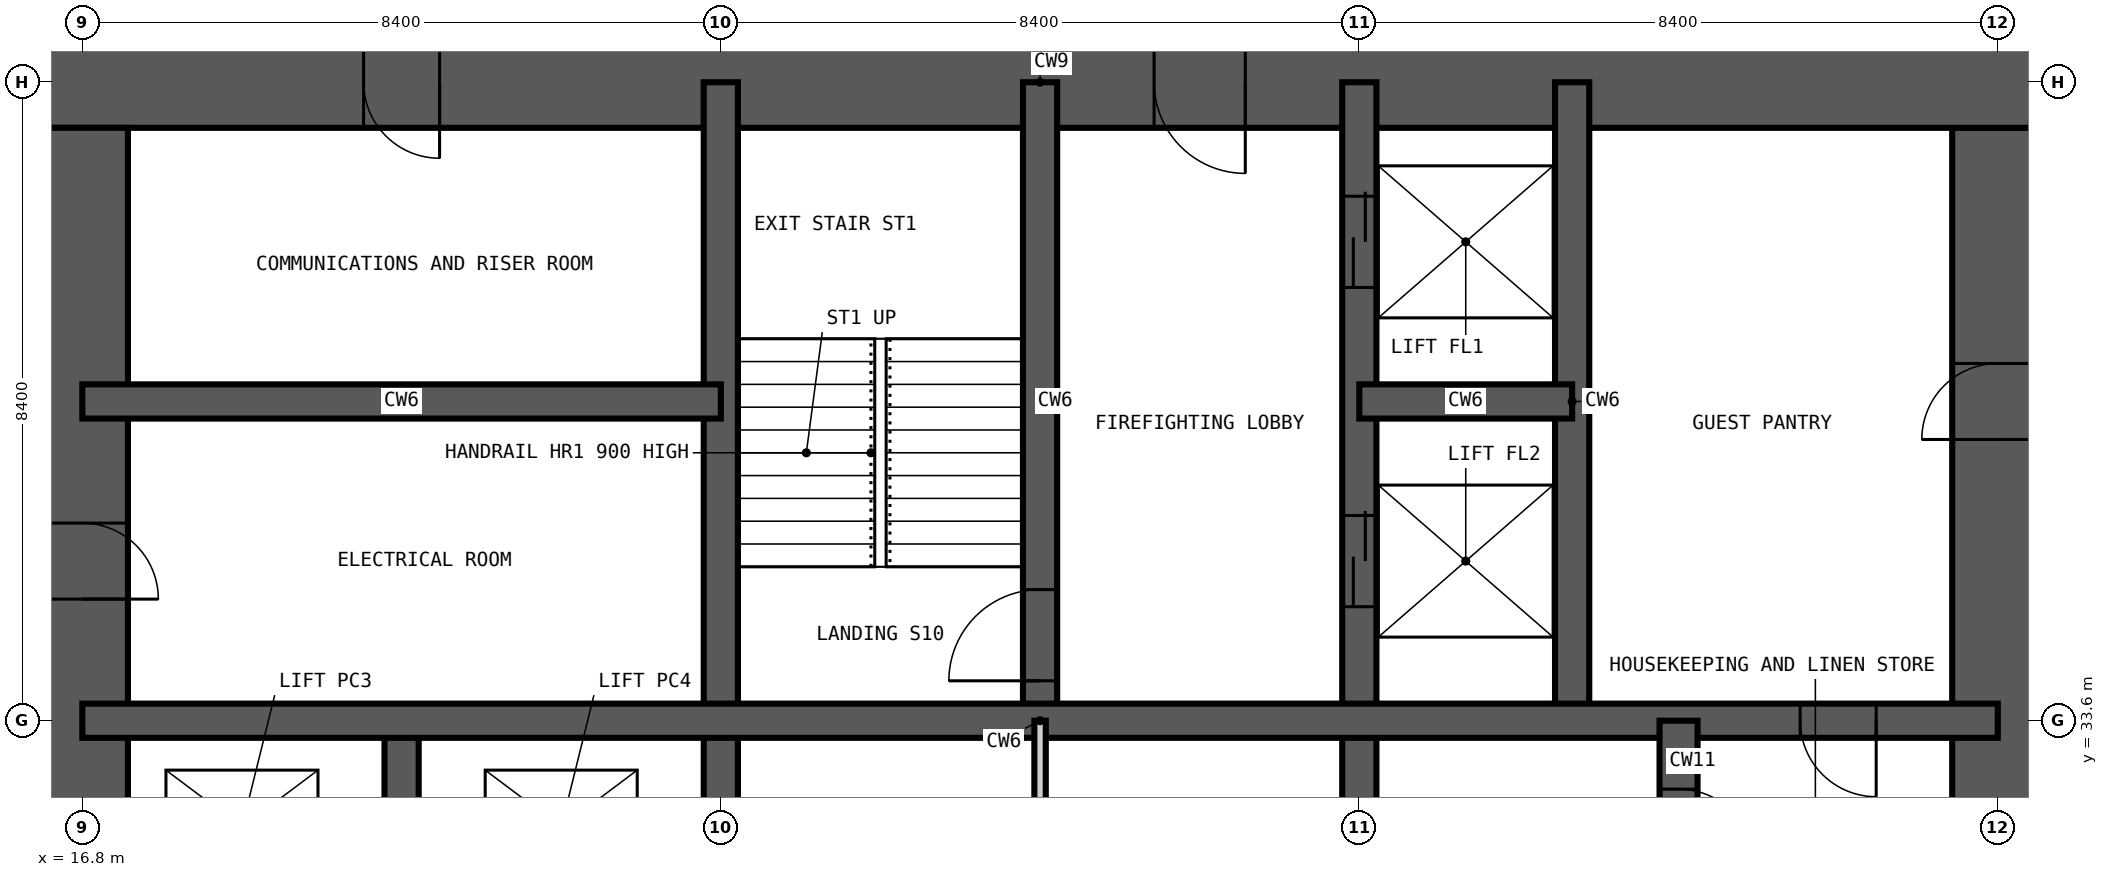
"""IFC4 building model, lengths in metres.
Left out: names, types, materials, properties, quantities, classifications, styles, units other than length and angle.
Written with IfcOpenShell. Run it as: python <this file> out.ifc"""

import sys

from ifc_helpers import new_model, si_unit, direction, frame, frame_2d, origin, place, context, subcontext, project, spatial, rectangle, extrude, element, fill, save


model = new_model("IFC4")
c1 = context("Model", 3, precision=1e-05, world=origin(), true_north=direction((0.0, 1.0)))
c2 = subcontext(c1, "Body", "Model", "MODEL_VIEW")
j1 = project(units=[si_unit("LENGTHUNIT", "METRE"), si_unit("PLANEANGLEUNIT", "RADIAN")], contexts=[c1])
p1 = place(None, origin())
s1 = spatial("IfcSite", under=j1, at=p1, CompositionType="ELEMENT")
p2 = place(p1, origin())
s2 = spatial("IfcBuilding", under=s1, at=p2, CompositionType="ELEMENT")
p3 = place(p2, frame((0.0, 0.0, 97.2)))
s3 = spatial("IfcBuildingStorey", under=s2, at=p3, CompositionType="ELEMENT", Elevation=97.2)
p4 = place(p3, frame((42.0, 17.4, -0.35), z_axis=(0.0, 0.0, 1.0), x_axis=(0.0, 1.0, 0.0)))
e1 = element("IfcWall", 1, at=p4, inside=s3, PredefinedType="SHEAR", context=c2, shape_type="SweptSolid", body=[
    extrude(rectangle(XDim=24.0, YDim=1.2, at=frame_2d((12.0, 0.0))), origin(), (0.0, 0.0, 1.0), 3.6),
])
p5 = place(p4, frame((0.2, 0.0, 0.35)))
e2 = element("IfcOpeningElement", 2, at=p5, cuts=e1, PredefinedType="OPENING", context=c2, shape_type="SweptSolid", body=[
    extrude(rectangle(XDim=1.2, YDim=2.2, at=frame_2d((0.6, 1.1))), frame((0.0, 0.61, 0.0), z_axis=(0.0, -1.0, 0.0), x_axis=(1.0, 0.0, 0.0)), (0.0, 0.0, 1.0), 1.22),
])
p6 = place(p4, frame((11.1, 0.0, 0.35)))
e3 = element("IfcOpeningElement", 3, at=p6, cuts=e1, PredefinedType="OPENING", context=c2, shape_type="SweptSolid", body=[
    extrude(rectangle(XDim=1.8, YDim=2.2, at=frame_2d((0.9, 1.1))), frame((0.0, 0.61, 0.0), z_axis=(0.0, -1.0, 0.0), x_axis=(1.0, 0.0, 0.0)), (0.0, 0.0, 1.0), 1.22),
])
p7 = place(p4, frame((19.9, 0.0, 0.35)))
e4 = element("IfcOpeningElement", 4, at=p7, cuts=e1, PredefinedType="OPENING", context=c2, shape_type="SweptSolid", body=[
    extrude(rectangle(XDim=1.0, YDim=2.1, at=frame_2d((0.5, 1.05))), frame((0.0, 0.61, 0.0), z_axis=(0.0, -1.0, 0.0), x_axis=(1.0, 0.0, 0.0)), (0.0, 0.0, 1.0), 1.22),
])
p8 = place(p3, frame((42.6, 42.0, -0.35), z_axis=(0.0, 0.0, 1.0), x_axis=(-1.0, 0.0, 0.0)))
e5 = element("IfcWall", 5, at=p8, inside=s3, PredefinedType="SHEAR", context=c2, shape_type="SweptSolid", body=[
    extrude(rectangle(XDim=26.4, YDim=1.2, at=frame_2d((13.2, 0.0))), origin(), (0.0, 0.0, 1.0), 3.6),
])
p9 = place(p8, frame((21.1, 0.0, 0.35)))
e6 = element("IfcOpeningElement", 6, at=p9, cuts=e5, PredefinedType="OPENING", context=c2, shape_type="SweptSolid", body=[
    extrude(rectangle(XDim=1.0, YDim=2.1, at=frame_2d((0.5, 1.05))), frame((0.0, 0.61, 0.0), z_axis=(0.0, -1.0, 0.0), x_axis=(1.0, 0.0, 0.0)), (0.0, 0.0, 1.0), 1.22),
])
p10 = place(p8, frame((10.5, 0.0, 0.35)))
e7 = element("IfcOpeningElement", 7, at=p10, cuts=e5, PredefinedType="OPENING", context=c2, shape_type="SweptSolid", body=[
    extrude(rectangle(XDim=1.2, YDim=2.2, at=frame_2d((0.6, 1.1))), frame((0.0, 0.61, 0.0), z_axis=(0.0, -1.0, 0.0), x_axis=(1.0, 0.0, 0.0)), (0.0, 0.0, 1.0), 1.22),
])
p11 = place(p3, frame((16.8, 41.4, -0.35), z_axis=(0.0, 0.0, 1.0), x_axis=(0.0, -1.0, 0.0)))
e8 = element("IfcWall", 8, at=p11, inside=s3, PredefinedType="SHEAR", context=c2, shape_type="SweptSolid", body=[
    extrude(rectangle(XDim=24.0, YDim=1.2, at=frame_2d((12.0, 0.0))), origin(), (0.0, 0.0, 1.0), 3.6),
])
p12 = place(p11, frame((11.1, 0.0, 0.35)))
e9 = element("IfcOpeningElement", 9, at=p12, cuts=e8, PredefinedType="OPENING", context=c2, shape_type="SweptSolid", body=[
    extrude(rectangle(XDim=1.8, YDim=2.2, at=frame_2d((0.9, 1.1))), frame((0.0, 0.61, 0.0), z_axis=(0.0, -1.0, 0.0), x_axis=(1.0, 0.0, 0.0)), (0.0, 0.0, 1.0), 1.22),
])
p13 = place(p11, frame((19.9, 0.0, 0.35)))
e10 = element("IfcOpeningElement", 10, at=p13, cuts=e8, PredefinedType="OPENING", context=c2, shape_type="SweptSolid", body=[
    extrude(rectangle(XDim=1.0, YDim=2.1, at=frame_2d((0.5, 1.05))), frame((0.0, 0.61, 0.0), z_axis=(0.0, -1.0, 0.0), x_axis=(1.0, 0.0, 0.0)), (0.0, 0.0, 1.0), 1.22),
])
p14 = place(p11, frame((5.2, 0.0, 0.35)))
e11 = element("IfcOpeningElement", 11, at=p14, cuts=e8, PredefinedType="OPENING", context=c2, shape_type="SweptSolid", body=[
    extrude(rectangle(XDim=1.0, YDim=2.1, at=frame_2d((0.5, 1.05))), frame((0.0, 0.61, 0.0), z_axis=(0.0, -1.0, 0.0), x_axis=(1.0, 0.0, 0.0)), (0.0, 0.0, 1.0), 1.22),
])
p15 = place(p3, frame((21.0, 30.8, -0.35), z_axis=(0.0, 0.0, 1.0), x_axis=(0.0, 1.0, 0.0)))
e12 = element("IfcWall", 12, at=p15, inside=s3, PredefinedType="SHEAR", context=c2, shape_type="SweptSolid", body=[
    extrude(rectangle(XDim=2.8, YDim=0.45, at=frame_2d((1.4, 0.0))), origin(), (0.0, 0.0, 1.0), 3.6),
])
p16 = place(p3, frame((25.2, 16.8, -0.35), z_axis=(0.0, 0.0, 1.0), x_axis=(0.0, 1.0, 0.0)))
e13 = element("IfcWall", 13, at=p16, inside=s3, PredefinedType="SHEAR", context=c2, shape_type="SweptSolid", body=[
    extrude(rectangle(XDim=25.2, YDim=0.45, at=frame_2d((12.6, 0.0))), origin(), (0.0, 0.0, 1.0), 3.6),
])
p17 = place(p16, frame((12.1, 0.0, 0.35)))
e14 = element("IfcOpeningElement", 14, at=p17, cuts=e13, PredefinedType="OPENING", context=c2, shape_type="SweptSolid", body=[
    extrude(rectangle(XDim=1.0, YDim=2.1, at=frame_2d((0.5, 1.05))), frame((0.0, 0.235, 0.0), z_axis=(0.0, -1.0, 0.0), x_axis=(1.0, 0.0, 0.0)), (0.0, 0.0, 1.0), 0.47),
])
p18 = place(p3, frame((29.4, 33.6, -0.35), z_axis=(0.0, 0.0, 1.0), x_axis=(0.0, 1.0, 0.0)))
e15 = element("IfcWall", 15, at=p18, inside=s3, PredefinedType="SHEAR", context=c2, shape_type="SweptSolid", body=[
    extrude(rectangle(XDim=8.4, YDim=0.45, at=frame_2d((4.2, 0.0))), origin(), (0.0, 0.0, 1.0), 3.6),
])
p19 = place(p18, frame((0.525, 0.0, 0.35)))
e16 = element("IfcOpeningElement", 16, at=p19, cuts=e15, PredefinedType="OPENING", context=c2, shape_type="SweptSolid", body=[
    extrude(rectangle(XDim=1.2, YDim=2.2, at=frame_2d((0.6, 1.1))), frame((0.0, 0.235, 0.0), z_axis=(0.0, -1.0, 0.0), x_axis=(1.0, 0.0, 0.0)), (0.0, 0.0, 1.0), 0.47),
])
p20 = place(p3, frame((33.6, 16.8, -0.35), z_axis=(0.0, 0.0, 1.0), x_axis=(0.0, 1.0, 0.0)))
e17 = element("IfcWall", 17, at=p20, inside=s3, PredefinedType="SHEAR", context=c2, shape_type="SweptSolid", body=[
    extrude(rectangle(XDim=25.2, YDim=0.45, at=frame_2d((12.6, 0.0))), origin(), (0.0, 0.0, 1.0), 3.6),
])
p21 = place(p20, frame((22.5, 0.0, 0.35)))
e18 = element("IfcOpeningElement", 18, at=p21, cuts=e17, PredefinedType="OPENING", context=c2, shape_type="SweptSolid", body=[
    extrude(rectangle(XDim=1.2, YDim=2.2, at=frame_2d((0.6, 1.1))), frame((0.0, 0.235, 0.0), z_axis=(0.0, -1.0, 0.0), x_axis=(1.0, 0.0, 0.0)), (0.0, 0.0, 1.0), 0.47),
])
p22 = place(p20, frame((18.3, 0.0, 0.35)))
e19 = element("IfcOpeningElement", 19, at=p22, cuts=e17, PredefinedType="OPENING", context=c2, shape_type="SweptSolid", body=[
    extrude(rectangle(XDim=1.2, YDim=2.2, at=frame_2d((0.6, 1.1))), frame((0.0, 0.235, 0.0), z_axis=(0.0, -1.0, 0.0), x_axis=(1.0, 0.0, 0.0)), (0.0, 0.0, 1.0), 0.47),
])
p23 = place(p3, frame((36.4, 33.6, -0.35), z_axis=(0.0, 0.0, 1.0), x_axis=(0.0, 1.0, 0.0)))
e20 = element("IfcWall", 20, at=p23, inside=s3, PredefinedType="SHEAR", context=c2, shape_type="SweptSolid", body=[
    extrude(rectangle(XDim=8.4, YDim=0.45, at=frame_2d((4.2, 0.0))), origin(), (0.0, 0.0, 1.0), 3.6),
])
p24 = place(p3, frame((16.8, 33.6, -0.35), z_axis=(0.0, 0.0, 1.0), x_axis=(1.0, 0.0, 0.0)))
e21 = element("IfcWall", 21, at=p24, inside=s3, PredefinedType="SHEAR", context=c2, shape_type="SweptSolid", body=[
    extrude(rectangle(XDim=25.2, YDim=0.45, at=frame_2d((12.6, 0.0))), origin(), (0.0, 0.0, 1.0), 3.6),
])
p25 = place(p24, frame((22.6, 0.0, 0.35)))
e22 = element("IfcOpeningElement", 22, at=p25, cuts=e21, PredefinedType="OPENING", context=c2, shape_type="SweptSolid", body=[
    extrude(rectangle(XDim=1.0, YDim=2.1, at=frame_2d((0.5, 1.05))), frame((0.0, 0.235, 0.0), z_axis=(0.0, -1.0, 0.0), x_axis=(1.0, 0.0, 0.0)), (0.0, 0.0, 1.0), 0.47),
])
p26 = place(p3, frame((16.8, 37.8, -0.35), z_axis=(0.0, 0.0, 1.0), x_axis=(1.0, 0.0, 0.0)))
e23 = element("IfcWall", 23, at=p26, inside=s3, PredefinedType="SHEAR", context=c2, shape_type="SweptSolid", body=[
    extrude(rectangle(XDim=8.4, YDim=0.45, at=frame_2d((4.2, 0.0))), origin(), (0.0, 0.0, 1.0), 3.6),
])
p27 = place(p3, frame((33.6, 37.8, -0.35), z_axis=(0.0, 0.0, 1.0), x_axis=(1.0, 0.0, 0.0)))
e24 = element("IfcWall", 24, at=p27, inside=s3, PredefinedType="SHEAR", context=c2, shape_type="SweptSolid", body=[
    extrude(rectangle(XDim=2.8, YDim=0.45, at=frame_2d((1.4, 0.0))), origin(), (0.0, 0.0, 1.0), 3.6),
])
p28 = place(p3, frame((37.8, 30.8, -0.35), z_axis=(0.0, 0.0, 1.0), x_axis=(0.0, 1.0, 0.0)))
e25 = element("IfcWall", 25, at=p28, inside=s3, PredefinedType="SHEAR", context=c2, shape_type="SweptSolid", body=[
    extrude(rectangle(XDim=2.8, YDim=0.5, at=frame_2d((1.4, 0.0))), origin(), (0.0, 0.0, 1.0), 3.6),
])
p29 = place(p28, frame((0.9, 0.0, 0.35)))
e26 = element("IfcOpeningElement", 26, at=p29, cuts=e25, PredefinedType="OPENING", context=c2, shape_type="SweptSolid", body=[
    extrude(rectangle(XDim=1.0, YDim=2.1, at=frame_2d((0.5, 1.05))), frame((0.0, 0.26, 0.0), z_axis=(0.0, -1.0, 0.0), x_axis=(1.0, 0.0, 0.0)), (0.0, 0.0, 1.0), 0.52),
])
p30 = place(p3, frame((29.4, 25.2, 0.0), z_axis=(0.0, 0.0, 1.0), x_axis=(0.0, 1.0, 0.0)))
e27 = element("IfcWall", 27, at=p30, inside=s3, PredefinedType="PARTITIONING", context=c2, shape_type="SweptSolid", body=[
    extrude(rectangle(XDim=8.4, YDim=0.15, at=frame_2d((4.2, 0.0))), origin(), (0.0, 0.0, 1.0), 3.25),
])
p31 = place(p30, frame((3.7, 0.0, 0.0)))
e28 = element("IfcOpeningElement", 28, at=p31, cuts=e27, PredefinedType="OPENING", context=c2, shape_type="SweptSolid", body=[
    extrude(rectangle(XDim=1.0, YDim=2.1, at=frame_2d((0.5, 1.05))), frame((0.0, 0.085, 0.0), z_axis=(0.0, -1.0, 0.0), x_axis=(1.0, 0.0, 0.0)), (0.0, 0.0, 1.0), 0.17),
])
p32 = place(p19, origin())
e29 = element("IfcDoor", 29, at=p32, inside=s3, OperationType="SINGLE_SWING_LEFT", PredefinedType="DOOR", context=c2, shape_type="SweptSolid", body=[
    extrude(rectangle(XDim=1.2, YDim=2.2, at=frame_2d((0.6, 1.1))), frame((0.0, 0.025, 0.0), z_axis=(0.0, -1.0, 0.0), x_axis=(1.0, 0.0, 0.0)), (0.0, 0.0, 1.0), 0.05),
])
fill(e16, e29)
p33 = place(p21, origin())
e30 = element("IfcDoor", 30, at=p33, inside=s3, OperationType="DOUBLE_DOOR_SLIDING", PredefinedType="DOOR", context=c2, shape_type="SweptSolid", body=[
    extrude(rectangle(XDim=1.2, YDim=2.2, at=frame_2d((0.6, 1.1))), frame((0.0, 0.025, 0.0), z_axis=(0.0, -1.0, 0.0), x_axis=(1.0, 0.0, 0.0)), (0.0, 0.0, 1.0), 0.05),
])
fill(e18, e30)
p34 = place(p22, origin())
e31 = element("IfcDoor", 31, at=p34, inside=s3, OperationType="DOUBLE_DOOR_SLIDING", PredefinedType="DOOR", context=c2, shape_type="SweptSolid", body=[
    extrude(rectangle(XDim=1.2, YDim=2.2, at=frame_2d((0.6, 1.1))), frame((0.0, 0.025, 0.0), z_axis=(0.0, -1.0, 0.0), x_axis=(1.0, 0.0, 0.0)), (0.0, 0.0, 1.0), 0.05),
])
fill(e19, e31)
p35 = place(p14, origin())
e32 = element("IfcDoor", 32, at=p35, inside=s3, OperationType="SINGLE_SWING_RIGHT", PredefinedType="DOOR", context=c2, shape_type="SweptSolid", body=[
    extrude(rectangle(XDim=1.0, YDim=2.1, at=frame_2d((0.5, 1.05))), frame((0.0, 0.025, 0.0), z_axis=(0.0, -1.0, 0.0), x_axis=(1.0, 0.0, 0.0)), (0.0, 0.0, 1.0), 0.05),
])
fill(e11, e32)
p36 = place(p9, origin())
e33 = element("IfcDoor", 33, at=p36, inside=s3, OperationType="SINGLE_SWING_LEFT", PredefinedType="DOOR", context=c2, shape_type="SweptSolid", body=[
    extrude(rectangle(XDim=1.0, YDim=2.1, at=frame_2d((0.5, 1.05))), frame((0.0, 0.025, 0.0), z_axis=(0.0, -1.0, 0.0), x_axis=(1.0, 0.0, 0.0)), (0.0, 0.0, 1.0), 0.05),
])
fill(e6, e33)
p37 = place(p29, frame((1.0, 0.0, 0.0), z_axis=(0.0, 0.0, 1.0), x_axis=(-1.0, 0.0, 0.0)))
e34 = element("IfcDoor", 34, at=p37, inside=s3, OperationType="SINGLE_SWING_RIGHT", PredefinedType="DOOR", context=c2, shape_type="SweptSolid", body=[
    extrude(rectangle(XDim=1.0, YDim=2.1, at=frame_2d((0.5, 1.05))), frame((0.0, 0.025, 0.0), z_axis=(0.0, -1.0, 0.0), x_axis=(1.0, 0.0, 0.0)), (0.0, 0.0, 1.0), 0.05),
])
fill(e26, e34)
p38 = place(p25, frame((1.0, 0.0, 0.0), z_axis=(0.0, 0.0, 1.0), x_axis=(-1.0, 0.0, 0.0)))
e35 = element("IfcDoor", 35, at=p38, inside=s3, OperationType="SINGLE_SWING_LEFT", PredefinedType="DOOR", context=c2, shape_type="SweptSolid", body=[
    extrude(rectangle(XDim=1.0, YDim=2.1, at=frame_2d((0.5, 1.05))), frame((0.0, 0.025, 0.0), z_axis=(0.0, -1.0, 0.0), x_axis=(1.0, 0.0, 0.0)), (0.0, 0.0, 1.0), 0.05),
])
fill(e22, e35)
p39 = place(p10, origin())
e36 = element("IfcDoor", 36, at=p39, inside=s3, OperationType="SINGLE_SWING_LEFT", PredefinedType="DOOR", context=c2, shape_type="SweptSolid", body=[
    extrude(rectangle(XDim=1.2, YDim=2.2, at=frame_2d((0.6, 1.1))), frame((0.0, 0.025, 0.0), z_axis=(0.0, -1.0, 0.0), x_axis=(1.0, 0.0, 0.0)), (0.0, 0.0, 1.0), 0.05),
])
fill(e7, e36)
p40 = place(p7, origin())
e37 = element("IfcDoor", 37, at=p40, inside=s3, OperationType="SINGLE_SWING_LEFT", PredefinedType="DOOR", context=c2, shape_type="SweptSolid", body=[
    extrude(rectangle(XDim=1.0, YDim=2.1, at=frame_2d((0.5, 1.05))), frame((0.0, 0.025, 0.0), z_axis=(0.0, -1.0, 0.0), x_axis=(1.0, 0.0, 0.0)), (0.0, 0.0, 1.0), 0.05),
])
fill(e4, e37)
save(model, sys.argv[1])
